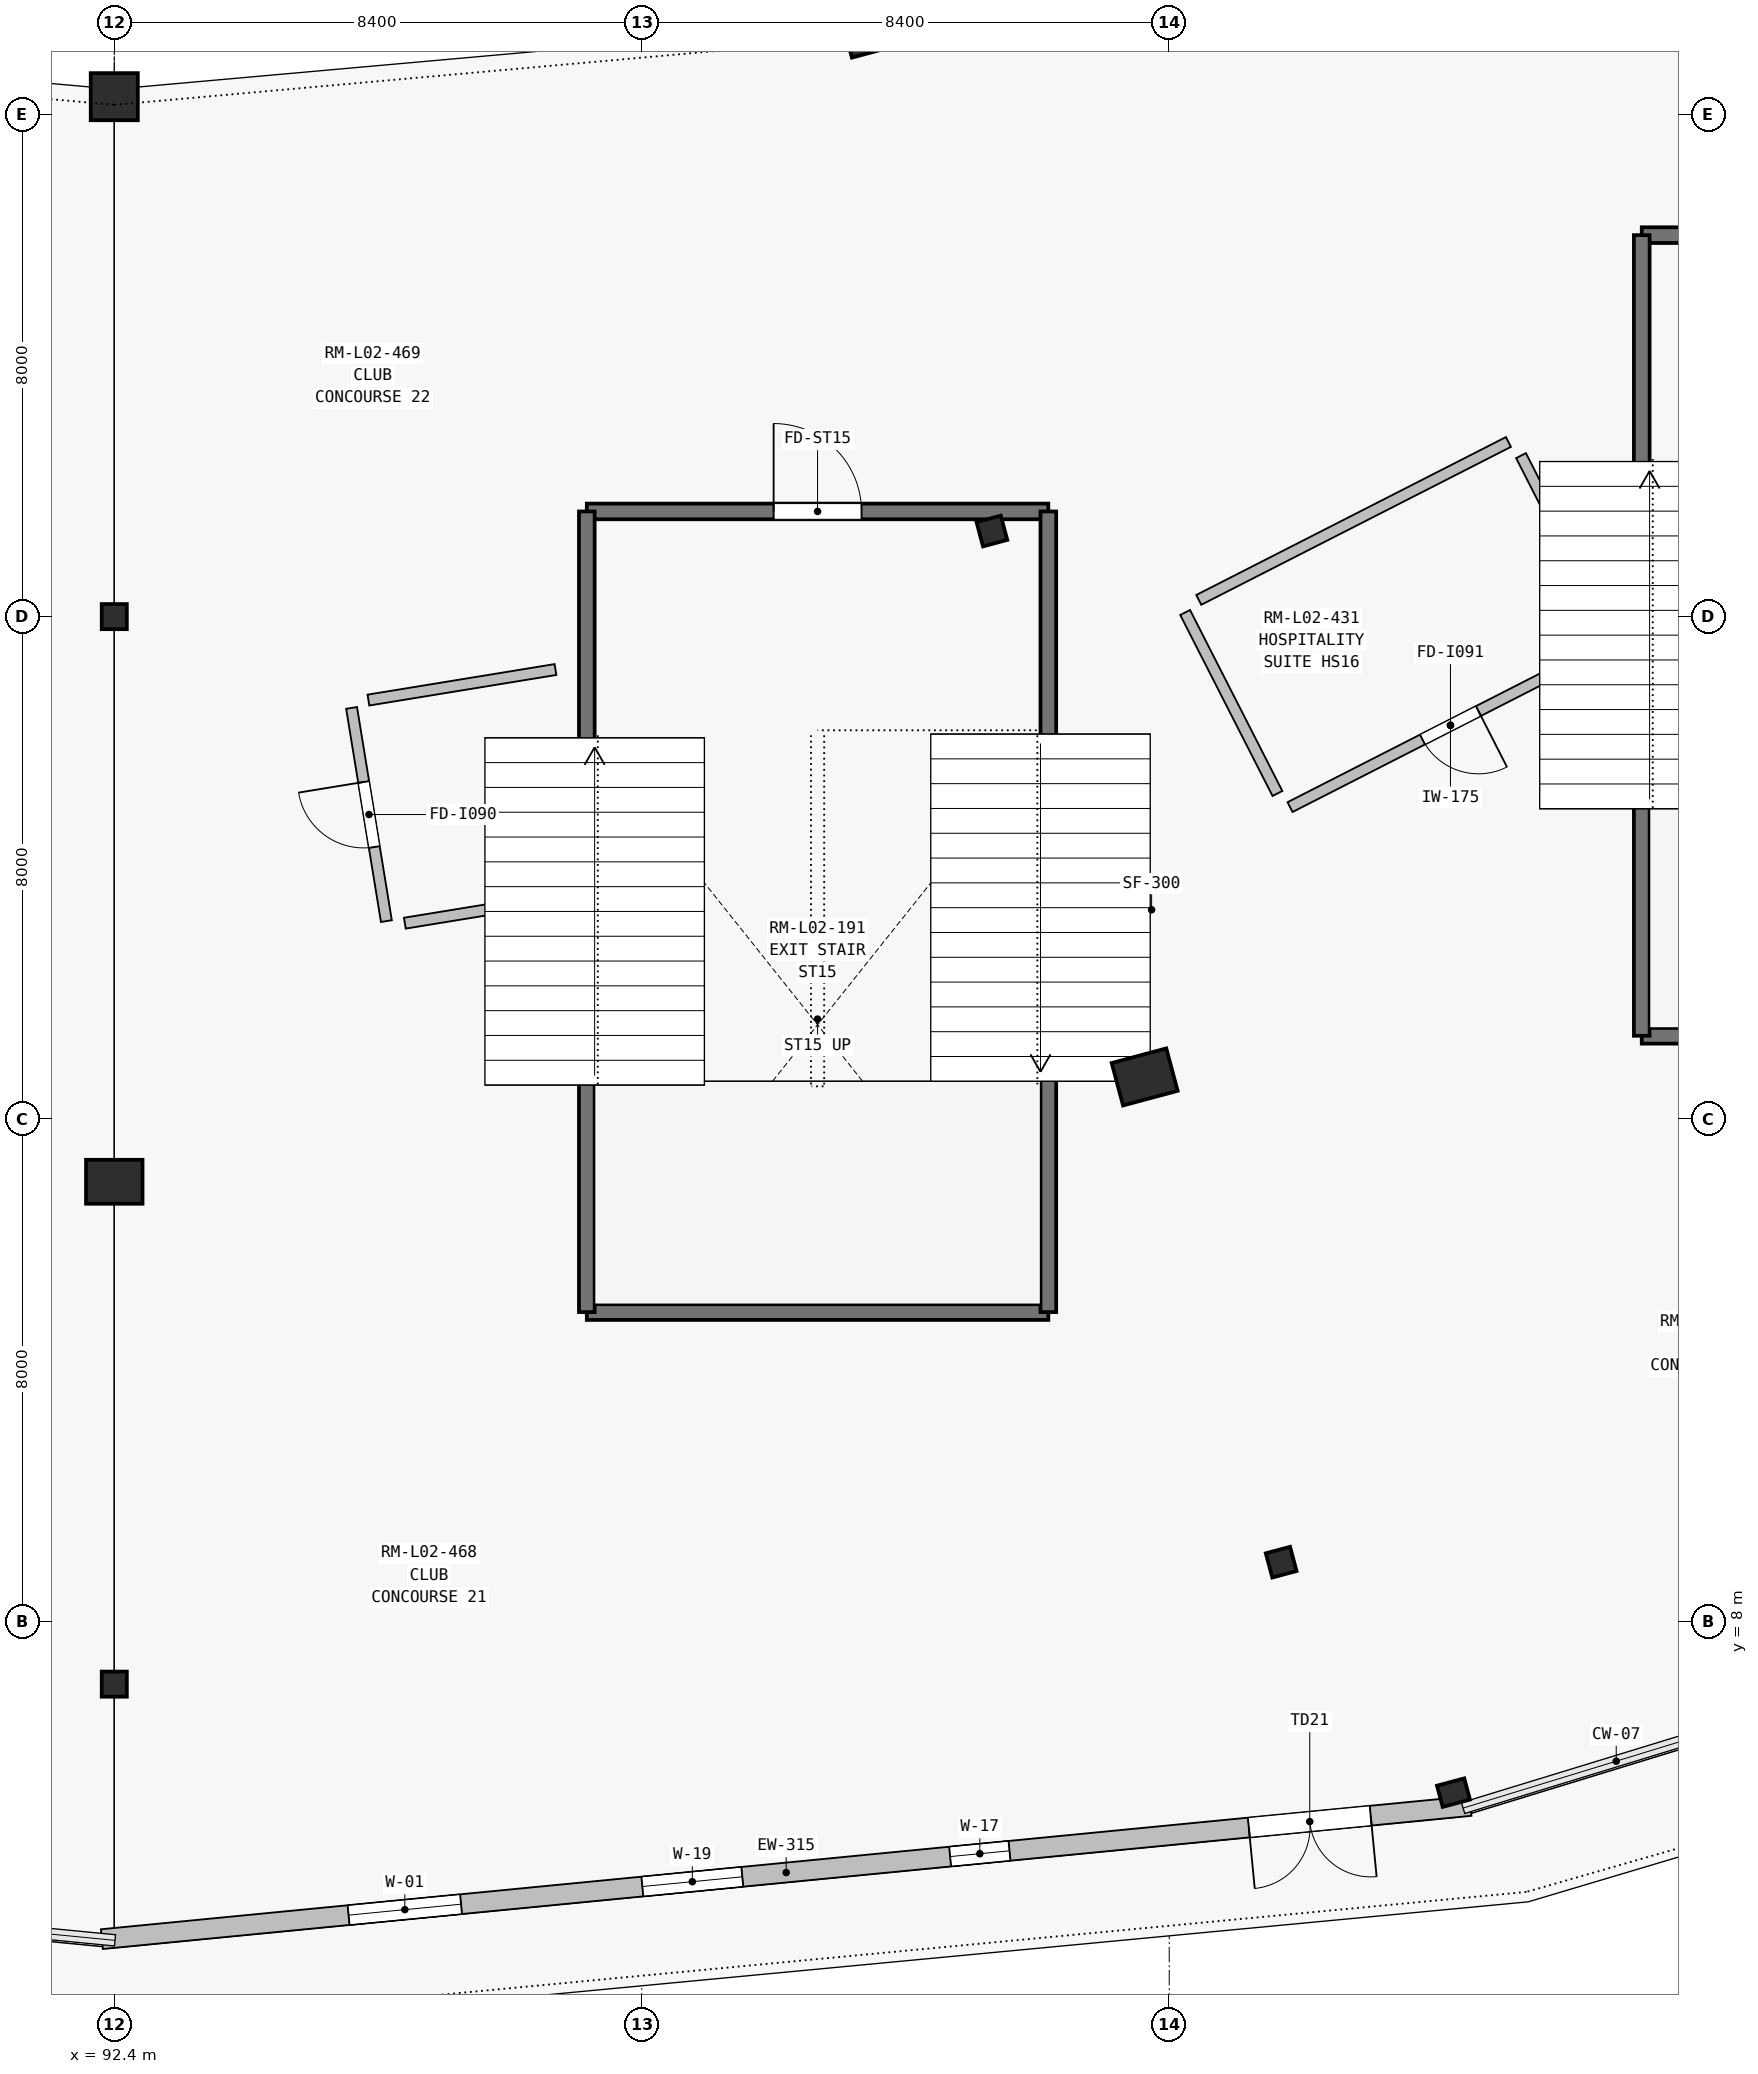
"""IFC4 building model, lengths in metres.
Left out: names, types, materials, properties, quantities, classifications, styles, units other than length and angle.
Written with IfcOpenShell. Run it as: python <this file> out.ifc"""

import sys

from ifc_helpers import new_model, si_unit, direction, frame, frame_2d, origin, origin_2d, place, context, subcontext, project, spatial, rectangle, i_section, extrude, element, fill, save


model = new_model("IFC4")
c1 = context("Model", 3, precision=1e-05, world=origin(), true_north=direction((0.0, 1.0)))
c2 = subcontext(c1, "Body", "Model", "MODEL_VIEW")
j1 = project(units=[si_unit("LENGTHUNIT", "METRE"), si_unit("PLANEANGLEUNIT", "RADIAN")], contexts=[c1])
p1 = place(None, origin())
s1 = spatial("IfcSite", under=j1, at=p1, CompositionType="ELEMENT")
p2 = place(p1, origin())
s2 = spatial("IfcBuilding", under=s1, at=p2, CompositionType="ELEMENT")
p3 = place(p2, frame((0.0, 0.0, 9.9)))
s3 = spatial("IfcBuildingStorey", under=s2, at=p3, CompositionType="ELEMENT", Elevation=9.9)
for number, where, z_axis, x_axis in (
    (1, (92.4, 24.0, 0.0), (0.0, 0.0, 1.0), (0.0, -1.0, 0.0)),
    (2, (106.376, 25.363, 0.0), (0.0, 0.0, 1.0), (0.259, -0.966, 0.0)),
):
    element("IfcColumn", number, at=place(p3, frame(where, z_axis=z_axis, x_axis=x_axis)), inside=s3, PredefinedType="COLUMN", context=c2, shape_type="SweptSolid", body=[
        extrude(i_section(OverallWidth=0.4, OverallDepth=0.4, WebThickness=0.018, FlangeThickness=0.032, at=origin_2d()), origin(), (0.0, 0.0, 1.0), 4.5),
    ])
p4 = place(p3, frame((92.4, 32.28, 0.0), z_axis=(0.0, 0.0, 1.0), x_axis=(0.0, -1.0, 0.0)))
e3 = element("IfcColumn", 3, at=p4, inside=s3, PredefinedType="COLUMN", context=c2, shape_type="SweptSolid", body=[
    extrude(rectangle(XDim=0.75, YDim=0.75, at=origin_2d()), origin(), (0.0, 0.0, 1.0), 3.554),
])
p5 = place(p3, frame((104.412, 33.361, 0.0), z_axis=(0.0, 0.0, 1.0), x_axis=(0.258819045103, -0.965925826289, 0.0)))
e4 = element("IfcColumn", 4, at=p5, inside=s3, PredefinedType="COLUMN", context=c2, shape_type="SweptSolid", body=[
    extrude(rectangle(XDim=0.75, YDim=0.75, at=origin_2d()), origin(), (0.0, 0.0, 1.0), 3.553),
])
for number, where, z_axis, x_axis in (
    (5, (92.4, 15.0, 0.0), (0.0, 0.0, 1.0), (0.0, -1.0, 0.0)),
    (6, (108.809, 16.67, 0.0), (0.0, 0.0, 1.0), (0.259, -0.966, 0.0)),
):
    element("IfcColumn", number, at=place(p3, frame(where, z_axis=z_axis, x_axis=x_axis)), inside=s3, PredefinedType="COLUMN", context=c2, shape_type="SweptSolid", body=[
        extrude(rectangle(XDim=0.7, YDim=0.9, at=origin_2d()), origin(), (0.0, 0.0, 1.0), 4.5),
    ])
for number, where, z_axis, x_axis in (
    (7, (92.4, 7.0, 0.0), (0.0, 0.0, 1.0), (0.0, -1.0, 0.0)),
    (8, (110.983, 8.942, 0.0), (0.0, 0.0, 1.0), (0.259, -0.966, 0.0)),
):
    element("IfcColumn", number, at=place(p3, frame(where, z_axis=z_axis, x_axis=x_axis)), inside=s3, PredefinedType="COLUMN", context=c2, shape_type="SweptSolid", body=[
        extrude(i_section(OverallWidth=0.4, OverallDepth=0.4, WebThickness=0.016, FlangeThickness=0.028, at=origin_2d()), origin(), (0.0, 0.0, 1.0), 4.5),
    ])
p6 = place(p3, frame((113.727, 5.272, 0.0), z_axis=(0.0, 0.0, 1.0), x_axis=(0.258819045103, -0.965925826289, 0.0)))
e9 = element("IfcColumn", 9, at=p6, inside=s3, PredefinedType="PILASTER", context=c2, shape_type="SweptSolid", body=[
    extrude(rectangle(XDim=0.35, YDim=0.45, at=origin_2d()), origin(), (0.0, 0.0, 1.0), 5.45),
])
p7 = place(p3, frame((113.997, 5.06, 0.0), z_axis=(0.0, 0.0, 1.0), x_axis=(-0.995299462798, -0.096845130773, 0.0)))
e10 = element("IfcWall", 10, at=p7, inside=s3, PredefinedType="SOLIDWALL", context=c2, shape_type="SweptSolid", body=[
    extrude(rectangle(XDim=21.897, YDim=0.315, at=frame_2d((10.948, 0.0))), origin(), (0.0, 0.0, 1.0), 4.265),
])
p8 = place(p7, frame((1.596, 0.0, 0.0)))
e11 = element("IfcOpeningElement", 11, at=p8, cuts=e10, PredefinedType="OPENING", context=c2, shape_type="SweptSolid", body=[
    extrude(rectangle(XDim=1.95, YDim=2.35, at=frame_2d((0.975, 1.175))), frame((0.0, 0.167, 0.0), z_axis=(0.0, -1.0, 0.0), x_axis=(1.0, 0.0, 0.0)), (0.0, 0.0, 1.0), 0.335),
])
p9 = place(p7, frame((7.375, 0.0, 0.75)))
e12 = element("IfcOpeningElement", 12, at=p9, cuts=e10, PredefinedType="OPENING", context=c2, shape_type="SweptSolid", body=[
    extrude(rectangle(XDim=0.95, YDim=2.2, at=frame_2d((0.475, 1.1))), frame((0.0, 0.167, 0.0), z_axis=(0.0, -1.0, 0.0), x_axis=(1.0, 0.0, 0.0)), (0.0, 0.0, 1.0), 0.335),
])
p10 = place(p7, frame((11.65, 0.0, 0.9)))
e13 = element("IfcOpeningElement", 13, at=p10, cuts=e10, PredefinedType="OPENING", context=c2, shape_type="SweptSolid", body=[
    extrude(rectangle(XDim=1.6, YDim=1.45, at=frame_2d((0.8, 0.725))), frame((0.0, 0.167, 0.0), z_axis=(0.0, -1.0, 0.0), x_axis=(1.0, 0.0, 0.0)), (0.0, 0.0, 1.0), 0.335),
])
p11 = place(p7, frame((16.15, 0.0, 0.75)))
e14 = element("IfcOpeningElement", 14, at=p11, cuts=e10, PredefinedType="OPENING", context=c2, shape_type="SweptSolid", body=[
    extrude(rectangle(XDim=1.8, YDim=2.4, at=frame_2d((0.9, 1.2))), frame((0.0, 0.167, 0.0), z_axis=(0.0, -1.0, 0.0), x_axis=(1.0, 0.0, 0.0)), (0.0, 0.0, 1.0), 0.335),
])
p12 = place(p3, frame((99.925, 12.925, 0.0), z_axis=(0.0, 0.0, 1.0), x_axis=(1.0, 0.0, 0.0)))
e15 = element("IfcWall", 15, at=p12, inside=s3, PredefinedType="SHEAR", context=c2, shape_type="SweptSolid", body=[
    extrude(rectangle(XDim=7.35, YDim=0.25, at=frame_2d((3.675, 0.0))), origin(), (0.0, 0.0, 1.0), 4.5),
])
p13 = place(p3, frame((99.925, 25.675, 0.0), z_axis=(0.0, 0.0, 1.0), x_axis=(1.0, 0.0, 0.0)))
e16 = element("IfcWall", 16, at=p13, inside=s3, PredefinedType="SHEAR", context=c2, shape_type="SweptSolid", body=[
    extrude(rectangle(XDim=7.35, YDim=0.25, at=frame_2d((3.675, 0.0))), origin(), (0.0, 0.0, 1.0), 4.5),
])
p14 = place(p13, frame((2.975, 0.0, 0.0)))
e17 = element("IfcOpeningElement", 17, at=p14, cuts=e16, PredefinedType="OPENING", context=c2, shape_type="SweptSolid", body=[
    extrude(rectangle(XDim=1.4, YDim=2.2, at=frame_2d((0.7, 1.1))), frame((0.0, 0.135, 0.0), z_axis=(0.0, -1.0, 0.0), x_axis=(1.0, 0.0, 0.0)), (0.0, 0.0, 1.0), 0.27),
])
for number, where, z_axis, x_axis in (
    (18, (99.925, 12.925, 0.0), (0.0, 0.0, 1.0), (0.0, 1.0, 0.0)),
    (19, (107.275, 12.925, 0.0), (0.0, 0.0, 1.0), (0.0, 1.0, 0.0)),
):
    element("IfcWall", number, at=place(p3, frame(where, z_axis=z_axis, x_axis=x_axis)), inside=s3, PredefinedType="SHEAR", context=c2, shape_type="SweptSolid", body=[
        extrude(rectangle(XDim=12.75, YDim=0.25, at=frame_2d((6.375, 0.0))), origin(), (0.0, 0.0, 1.0), 4.5),
    ])
p15 = place(p3, frame((116.725, 17.325, 0.0), z_axis=(0.0, 0.0, 1.0), x_axis=(1.0, 0.0, 0.0)))
e20 = element("IfcWall", 20, at=p15, inside=s3, PredefinedType="SHEAR", context=c2, shape_type="SweptSolid", body=[
    extrude(rectangle(XDim=7.35, YDim=0.25, at=frame_2d((3.675, 0.0))), origin(), (0.0, 0.0, 1.0), 4.5),
])
p16 = place(p3, frame((116.725, 30.075, 0.0), z_axis=(0.0, 0.0, 1.0), x_axis=(1.0, 0.0, 0.0)))
e21 = element("IfcWall", 21, at=p16, inside=s3, PredefinedType="SHEAR", context=c2, shape_type="SweptSolid", body=[
    extrude(rectangle(XDim=7.35, YDim=0.25, at=frame_2d((3.675, 0.0))), origin(), (0.0, 0.0, 1.0), 4.5),
])
p17 = place(p16, frame((3.015, 0.0, 0.0)))
e22 = element("IfcOpeningElement", 22, at=p17, cuts=e21, PredefinedType="OPENING", context=c2, shape_type="SweptSolid", body=[
    extrude(rectangle(XDim=1.32, YDim=2.2, at=frame_2d((0.66, 1.1))), frame((0.0, 0.135, 0.0), z_axis=(0.0, -1.0, 0.0), x_axis=(1.0, 0.0, 0.0)), (0.0, 0.0, 1.0), 0.27),
])
p18 = place(p3, frame((116.725, 17.325, 0.0), z_axis=(0.0, 0.0, 1.0), x_axis=(0.0, 1.0, 0.0)))
e23 = element("IfcWall", 23, at=p18, inside=s3, PredefinedType="SHEAR", context=c2, shape_type="SweptSolid", body=[
    extrude(rectangle(XDim=12.75, YDim=0.25, at=frame_2d((6.375, 0.0))), origin(), (0.0, 0.0, 1.0), 4.5),
])
p19 = place(p3, frame((96.733, 19.151, 0.0), z_axis=(0.0, 0.0, 1.0), x_axis=(-0.161117789867, 0.986935184188, 0.0)))
e24 = element("IfcWall", 24, at=p19, inside=s3, PredefinedType="PARTITIONING", context=c2, shape_type="SweptSolid", body=[
    extrude(rectangle(XDim=3.44, YDim=0.175, at=frame_2d((1.72, 0.0))), origin(), (0.0, 0.0, 1.0), 4.18),
])
p20 = place(p19, frame((1.195, 0.0, 0.0)))
e25 = element("IfcOpeningElement", 25, at=p20, cuts=e24, PredefinedType="OPENING", context=c2, shape_type="SweptSolid", body=[
    extrude(rectangle(XDim=1.05, YDim=2.25, at=frame_2d((0.525, 1.125))), frame((0.0, 0.097, 0.0), z_axis=(0.0, -1.0, 0.0), x_axis=(1.0, 0.0, 0.0)), (0.0, 0.0, 1.0), 0.195),
])
p21 = place(p3, frame((96.448, 22.671, 0.0), z_axis=(0.0, 0.0, 1.0), x_axis=(0.98693078035, 0.16114476348, 0.0)))
e26 = element("IfcWall", 26, at=p21, inside=s3, PredefinedType="PARTITIONING", context=c2, shape_type="SweptSolid", body=[
    extrude(rectangle(XDim=3.018, YDim=0.175, at=frame_2d((1.509, 0.0))), origin(), (0.0, 0.0, 1.0), 4.18),
])
p22 = place(p3, frame((99.426, 19.51, 0.0), z_axis=(0.0, 0.0, 1.0), x_axis=(-0.986934184777, -0.161123911693, 0.0)))
e27 = element("IfcWall", 27, at=p22, inside=s3, PredefinedType="PARTITIONING", context=c2, shape_type="SweptSolid", body=[
    extrude(rectangle(XDim=2.43, YDim=0.175, at=frame_2d((1.215, 0.0))), origin(), (0.0, 0.0, 1.0), 4.18),
])
p23 = place(p3, frame((116.234, 23.572, 0.0), z_axis=(0.0, 0.0, 1.0), x_axis=(-0.890840624342, -0.454315949557, 0.0)))
e28 = element("IfcWall", 28, at=p23, inside=s3, PredefinedType="PARTITIONING", context=c2, shape_type="SweptSolid", body=[
    extrude(rectangle(XDim=5.736, YDim=0.175, at=frame_2d((2.868, 0.0))), origin(), (0.0, 0.0, 1.0), 4.18),
])
p24 = place(p23, frame((2.368, 0.0, 0.0)))
e29 = element("IfcOpeningElement", 29, at=p24, cuts=e28, PredefinedType="OPENING", context=c2, shape_type="SweptSolid", body=[
    extrude(rectangle(XDim=1.0, YDim=2.2, at=frame_2d((0.5, 1.1))), frame((0.0, 0.097, 0.0), z_axis=(0.0, -1.0, 0.0), x_axis=(1.0, 0.0, 0.0)), (0.0, 0.0, 1.0), 0.195),
])
p25 = place(p3, frame((110.923, 21.184, 0.0), z_axis=(0.0, 0.0, 1.0), x_axis=(-0.454353030946, 0.890821712393, 0.0)))
e30 = element("IfcWall", 30, at=p25, inside=s3, PredefinedType="PARTITIONING", context=c2, shape_type="SweptSolid", body=[
    extrude(rectangle(XDim=3.235, YDim=0.175, at=frame_2d((1.618, 0.0))), origin(), (0.0, 0.0, 1.0), 4.18),
])
p26 = place(p3, frame((109.671, 24.266, 0.0), z_axis=(0.0, 0.0, 1.0), x_axis=(0.890825995052, 0.454344634105, 0.0)))
e31 = element("IfcWall", 31, at=p26, inside=s3, PredefinedType="PARTITIONING", context=c2, shape_type="SweptSolid", body=[
    extrude(rectangle(XDim=5.535, YDim=0.175, at=frame_2d((2.768, 0.0))), origin(), (0.0, 0.0, 1.0), 4.18),
])
p27 = place(p3, frame((114.802, 26.564, 0.0), z_axis=(0.0, 0.0, 1.0), x_axis=(0.454317775379, -0.890839693197, 0.0)))
e32 = element("IfcWall", 32, at=p27, inside=s3, PredefinedType="PARTITIONING", context=c2, shape_type="SweptSolid", body=[
    extrude(rectangle(XDim=3.032, YDim=0.175, at=frame_2d((1.516, 0.0))), origin(), (0.0, 0.0, 1.0), 4.18),
])
p28 = place(p8, origin())
e33 = element("IfcDoor", 33, at=p28, inside=s3, OperationType="DOUBLE_DOOR_SINGLE_SWING", PredefinedType="DOOR", context=c2, shape_type="SweptSolid", body=[
    extrude(rectangle(XDim=1.95, YDim=2.35, at=frame_2d((0.975, 1.175))), frame((0.0, 0.025, 0.0), z_axis=(0.0, -1.0, 0.0), x_axis=(1.0, 0.0, 0.0)), (0.0, 0.0, 1.0), 0.05),
])
fill(e11, e33)
p29 = place(p9, origin())
e34 = element("IfcWindow", 34, at=p29, inside=s3, PartitioningType="SINGLE_PANEL", PredefinedType="WINDOW", context=c2, shape_type="SweptSolid", body=[
    extrude(rectangle(XDim=0.95, YDim=2.2, at=frame_2d((0.475, 1.1))), frame((0.0, 0.03, 0.0), z_axis=(0.0, -1.0, 0.0), x_axis=(1.0, 0.0, 0.0)), (0.0, 0.0, 1.0), 0.06),
])
fill(e12, e34)
p30 = place(p10, origin())
e35 = element("IfcWindow", 35, at=p30, inside=s3, PartitioningType="SINGLE_PANEL", PredefinedType="WINDOW", context=c2, shape_type="SweptSolid", body=[
    extrude(rectangle(XDim=1.6, YDim=1.45, at=frame_2d((0.8, 0.725))), frame((0.0, 0.03, 0.0), z_axis=(0.0, -1.0, 0.0), x_axis=(1.0, 0.0, 0.0)), (0.0, 0.0, 1.0), 0.06),
])
fill(e13, e35)
p31 = place(p11, origin())
e36 = element("IfcWindow", 36, at=p31, inside=s3, PartitioningType="SINGLE_PANEL", PredefinedType="WINDOW", context=c2, shape_type="SweptSolid", body=[
    extrude(rectangle(XDim=1.8, YDim=2.4, at=frame_2d((0.9, 1.2))), frame((0.0, 0.03, 0.0), z_axis=(0.0, -1.0, 0.0), x_axis=(1.0, 0.0, 0.0)), (0.0, 0.0, 1.0), 0.06),
])
fill(e14, e36)
p32 = place(p14, origin())
e37 = element("IfcDoor", 37, at=p32, inside=s3, OperationType="SINGLE_SWING_LEFT", PredefinedType="DOOR", context=c2, shape_type="SweptSolid", body=[
    extrude(rectangle(XDim=1.4, YDim=2.2, at=frame_2d((0.7, 1.1))), frame((0.0, 0.025, 0.0), z_axis=(0.0, -1.0, 0.0), x_axis=(1.0, 0.0, 0.0)), (0.0, 0.0, 1.0), 0.05),
])
fill(e17, e37)
p33 = place(p20, origin())
e38 = element("IfcDoor", 38, at=p33, inside=s3, OperationType="SINGLE_SWING_RIGHT", PredefinedType="DOOR", context=c2, shape_type="SweptSolid", body=[
    extrude(rectangle(XDim=1.05, YDim=2.25, at=frame_2d((0.525, 1.125))), frame((0.0, 0.025, 0.0), z_axis=(0.0, -1.0, 0.0), x_axis=(1.0, 0.0, 0.0)), (0.0, 0.0, 1.0), 0.05),
])
fill(e25, e38)
p34 = place(p24, origin())
e39 = element("IfcDoor", 39, at=p34, inside=s3, OperationType="SINGLE_SWING_LEFT", PredefinedType="DOOR", context=c2, shape_type="SweptSolid", body=[
    extrude(rectangle(XDim=1.0, YDim=2.2, at=frame_2d((0.5, 1.1))), frame((0.0, 0.025, 0.0), z_axis=(0.0, -1.0, 0.0), x_axis=(1.0, 0.0, 0.0)), (0.0, 0.0, 1.0), 0.05),
])
fill(e29, e39)
save(model, sys.argv[1])
